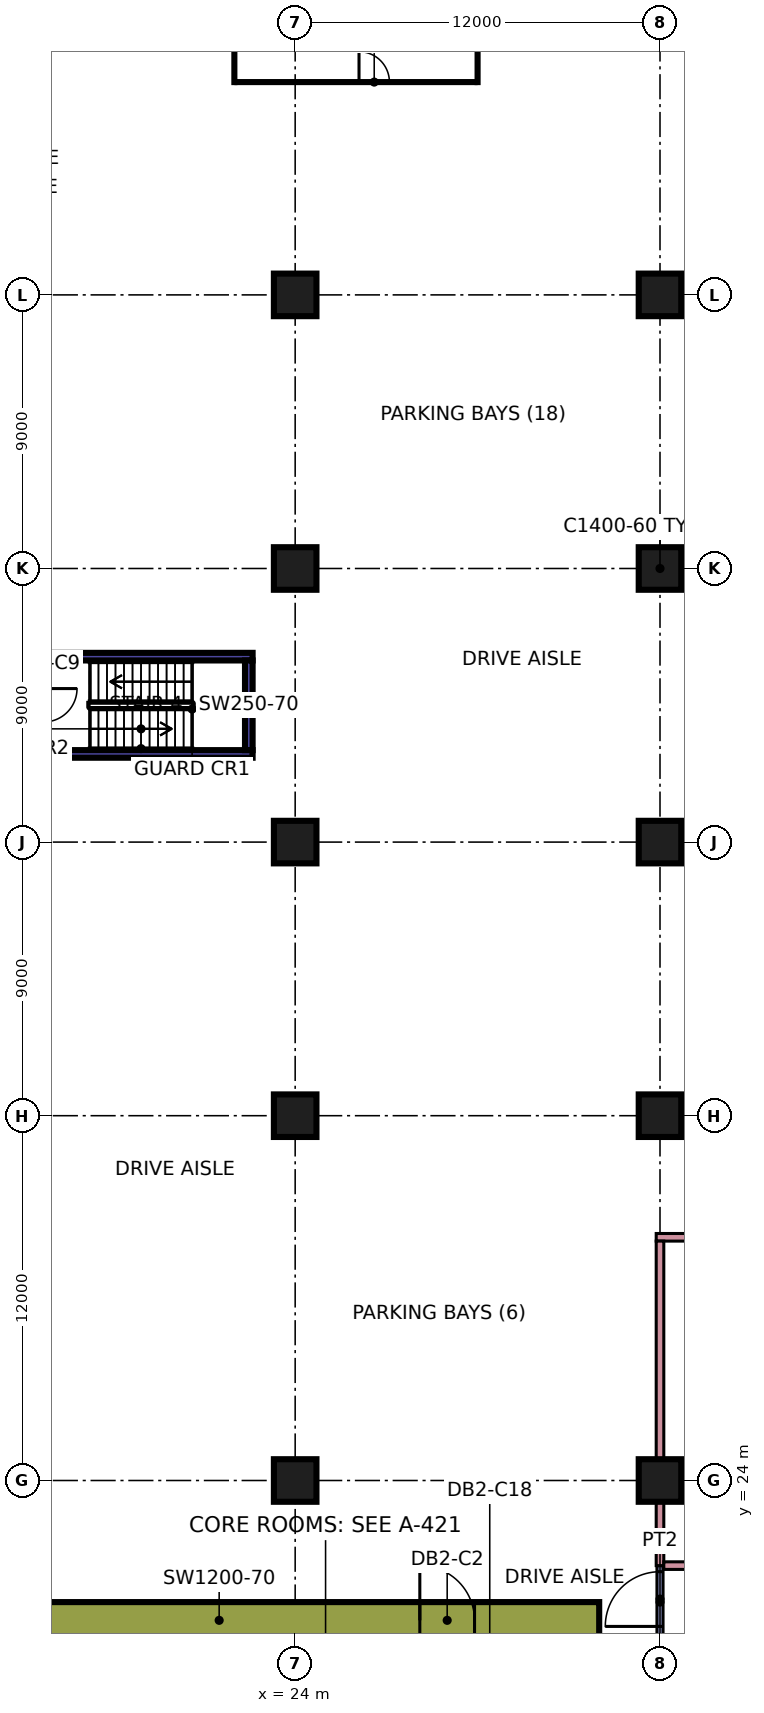
"""IFC4 building model, lengths in metres.
Left out: names, types, materials, properties, quantities, classifications, styles, units other than length and angle.
Written with IfcOpenShell. Run it as: python <this file> out.ifc"""

import sys

from ifc_helpers import new_model, si_unit, direction, frame, frame_2d, origin, origin_2d, place, context, subcontext, project, spatial, rectangle, extrude, element, fill, save


model = new_model("IFC4")
c1 = context("Model", 3, precision=1e-05, world=origin(), true_north=direction((0.0, 1.0)))
c2 = subcontext(c1, "Body", "Model", "MODEL_VIEW")
j1 = project(units=[si_unit("LENGTHUNIT", "METRE"), si_unit("PLANEANGLEUNIT", "RADIAN")], contexts=[c1])
p1 = place(None, origin())
s1 = spatial("IfcSite", under=j1, at=p1, CompositionType="ELEMENT")
p2 = place(p1, origin())
s2 = spatial("IfcBuilding", under=s1, at=p2, CompositionType="ELEMENT")
p3 = place(p2, frame((0.0, 0.0, -9.0)))
s3 = spatial("IfcBuildingStorey", under=s2, at=p3, CompositionType="ELEMENT", Elevation=-9.0)
for number, where, z_axis, x_axis in (
    (1, (24.0, 24.0, 0.0), (0.0, 0.0, 1.0), (1.0, 0.0, 0.0)),
    (2, (24.0, 36.0, 0.0), (0.0, 0.0, 1.0), (1.0, 0.0, 0.0)),
    (3, (24.0, 45.0, 0.0), (0.0, 0.0, 1.0), (1.0, 0.0, 0.0)),
    (4, (24.0, 54.0, 0.0), (0.0, 0.0, 1.0), (1.0, 0.0, 0.0)),
    (5, (24.0, 63.0, 0.0), (0.0, 0.0, 1.0), (1.0, 0.0, 0.0)),
    (6, (36.0, 24.0, 0.0), (0.0, 0.0, 1.0), (1.0, 0.0, 0.0)),
    (7, (36.0, 36.0, 0.0), (0.0, 0.0, 1.0), (1.0, 0.0, 0.0)),
    (8, (36.0, 45.0, 0.0), (0.0, 0.0, 1.0), (1.0, 0.0, 0.0)),
    (9, (36.0, 54.0, 0.0), (0.0, 0.0, 1.0), (1.0, 0.0, 0.0)),
    (10, (36.0, 63.0, 0.0), (0.0, 0.0, 1.0), (1.0, 0.0, 0.0)),
):
    element("IfcColumn", number, at=place(p3, frame(where, z_axis=z_axis, x_axis=x_axis)), inside=s3, PredefinedType="COLUMN", context=c2, shape_type="SweptSolid", body=[
        extrude(rectangle(XDim=1.4, YDim=1.4, at=origin_2d()), origin(), (0.0, 0.0, 1.0), 4.5),
    ])
p4 = place(p3, frame((9.0, 19.4, 0.0), z_axis=(0.0, 0.0, 1.0), x_axis=(1.0, 0.0, 0.0)))
e11 = element("IfcWall", 11, at=p4, inside=s3, PredefinedType="SHEAR", context=c2, shape_type="SweptSolid", body=[
    extrude(rectangle(XDim=25.0, YDim=1.2, at=frame_2d((12.5, 0.0))), origin(), (0.0, 0.0, 1.0), 4.5),
])
p5 = place(p4, frame((19.1, 0.0, 0.0)))
e12 = element("IfcOpeningElement", 12, at=p5, cuts=e11, PredefinedType="OPENING", context=c2, shape_type="SweptSolid", body=[
    extrude(rectangle(XDim=1.8, YDim=2.4, at=frame_2d((0.9, 1.2))), frame((0.0, 0.61, 0.0), z_axis=(0.0, -1.0, 0.0), x_axis=(1.0, 0.0, 0.0)), (0.0, 0.0, 1.0), 1.22),
])
for number, where, z_axis, x_axis in (
    (13, (15.6, 47.9, 0.0), (0.0, 0.0, 1.0), (1.0, 0.0, 0.0)),
    (14, (15.6, 51.1, 0.0), (0.0, 0.0, 1.0), (1.0, 0.0, 0.0)),
):
    element("IfcWall", number, at=place(p3, frame(where, z_axis=z_axis, x_axis=x_axis)), inside=s3, PredefinedType="SHEAR", context=c2, shape_type="SweptSolid", body=[
        extrude(rectangle(XDim=7.0, YDim=0.25, at=frame_2d((3.5, 0.0))), origin(), (0.0, 0.0, 1.0), 4.5),
    ])
p6 = place(p3, frame((22.475, 48.025, 0.0), z_axis=(0.0, 0.0, 1.0), x_axis=(0.0, 1.0, 0.0)))
e15 = element("IfcWall", 15, at=p6, inside=s3, PredefinedType="SHEAR", context=c2, shape_type="SweptSolid", body=[
    extrude(rectangle(XDim=2.95, YDim=0.25, at=frame_2d((1.475, 0.0))), origin(), (0.0, 0.0, 1.0), 4.5),
])
p7 = place(p3, frame((22.0, 69.95, 0.0), z_axis=(0.0, 0.0, 1.0), x_axis=(0.0, 1.0, 0.0)))
e16 = element("IfcWall", 16, at=p7, inside=s3, PredefinedType="PARTITIONING", context=c2, shape_type="SweptSolid", body=[
    extrude(rectangle(XDim=10.1, YDim=0.1, at=frame_2d((5.05, 0.0))), origin(), (0.0, 0.0, 1.0), 4.05),
])
p8 = place(p3, frame((22.05, 70.0, 0.0), z_axis=(0.0, 0.0, 1.0), x_axis=(1.0, 0.0, 0.0)))
e17 = element("IfcWall", 17, at=p8, inside=s3, PredefinedType="PARTITIONING", context=c2, shape_type="SweptSolid", body=[
    extrude(rectangle(XDim=7.9, YDim=0.1, at=frame_2d((3.95, 0.0))), origin(), (0.0, 0.0, 1.0), 4.05),
])
p9 = place(p8, frame((4.05, 0.0, 0.0)))
e18 = element("IfcOpeningElement", 18, at=p9, cuts=e17, PredefinedType="OPENING", context=c2, shape_type="SweptSolid", body=[
    extrude(rectangle(XDim=1.0, YDim=2.1, at=frame_2d((0.5, 1.05))), frame((0.0, 0.06, 0.0), z_axis=(0.0, -1.0, 0.0), x_axis=(1.0, 0.0, 0.0)), (0.0, 0.0, 1.0), 0.12),
])
p10 = place(p3, frame((30.0, 69.95, 0.0), z_axis=(0.0, 0.0, 1.0), x_axis=(0.0, 1.0, 0.0)))
e19 = element("IfcWall", 19, at=p10, inside=s3, PredefinedType="PARTITIONING", context=c2, shape_type="SweptSolid", body=[
    extrude(rectangle(XDim=10.1, YDim=0.1, at=frame_2d((5.05, 0.0))), origin(), (0.0, 0.0, 1.0), 4.05),
])
p11 = place(p3, frame((35.875, 32.0, 0.0), z_axis=(0.0, 0.0, 1.0), x_axis=(1.0, 0.0, 0.0)))
e20 = element("IfcWall", 20, at=p11, inside=s3, PredefinedType="PARTITIONING", context=c2, shape_type="SweptSolid", body=[
    extrude(rectangle(XDim=33.809, YDim=0.25, at=frame_2d((16.905, 0.0))), origin(), (0.0, 0.0, 1.0), 4.05),
])
p12 = place(p3, frame((36.0, 18.8, 0.0), z_axis=(0.0, 0.0, 1.0), x_axis=(0.0, 1.0, 0.0)))
e21 = element("IfcWall", 21, at=p12, inside=s3, PredefinedType="PARTITIONING", context=c2, shape_type="SweptSolid", body=[
    extrude(rectangle(XDim=2.4, YDim=0.2, at=frame_2d((1.2, 0.0))), origin(), (0.0, 0.0, 1.0), 4.05),
])
p13 = place(p12, frame((0.4, 0.0, 0.0)))
e22 = element("IfcOpeningElement", 22, at=p13, cuts=e21, PredefinedType="OPENING", context=c2, shape_type="SweptSolid", body=[
    extrude(rectangle(XDim=1.8, YDim=2.1, at=frame_2d((0.9, 1.05))), frame((0.0, 0.11, 0.0), z_axis=(0.0, -1.0, 0.0), x_axis=(1.0, 0.0, 0.0)), (0.0, 0.0, 1.0), 0.22),
])
p14 = place(p3, frame((36.0, 21.2, 0.0), z_axis=(0.0, 0.0, 1.0), x_axis=(0.0, 1.0, 0.0)))
e23 = element("IfcWall", 23, at=p14, inside=s3, PredefinedType="PARTITIONING", context=c2, shape_type="SweptSolid", body=[
    extrude(rectangle(XDim=2.101, YDim=0.25, at=frame_2d((1.051, 0.0))), origin(), (0.0, 0.0, 1.0), 4.05),
])
p15 = place(p3, frame((36.0, 24.699, 0.0), z_axis=(0.0, 0.0, 1.0), x_axis=(0.0, 1.0, 0.0)))
e24 = element("IfcWall", 24, at=p15, inside=s3, PredefinedType="PARTITIONING", context=c2, shape_type="SweptSolid", body=[
    extrude(rectangle(XDim=7.176, YDim=0.25, at=frame_2d((3.588, 0.0))), origin(), (0.0, 0.0, 1.0), 4.05),
])
p16 = place(p3, frame((36.125, 21.2, 0.0), z_axis=(0.0, 0.0, 1.0), x_axis=(1.0, 0.0, 0.0)))
e25 = element("IfcWall", 25, at=p16, inside=s3, PredefinedType="PARTITIONING", context=c2, shape_type="SweptSolid", body=[
    extrude(rectangle(XDim=5.375, YDim=0.25, at=frame_2d((2.688, 0.0))), origin(), (0.0, 0.0, 1.0), 4.05),
])
p17 = place(p16, frame((1.675, 0.0, 0.0)))
e26 = element("IfcOpeningElement", 26, at=p17, cuts=e25, PredefinedType="OPENING", context=c2, shape_type="SweptSolid", body=[
    extrude(rectangle(XDim=1.8, YDim=2.1, at=frame_2d((0.9, 1.05))), frame((0.0, 0.135, 0.0), z_axis=(0.0, -1.0, 0.0), x_axis=(1.0, 0.0, 0.0)), (0.0, 0.0, 1.0), 0.27),
])
p18 = place(p5, origin())
e27 = element("IfcDoor", 27, at=p18, inside=s3, OperationType="DOUBLE_DOOR_SINGLE_SWING", PredefinedType="DOOR", context=c2, shape_type="SweptSolid", body=[
    extrude(rectangle(XDim=1.8, YDim=2.4, at=frame_2d((0.9, 1.2))), frame((0.0, 0.025, 0.0), z_axis=(0.0, -1.0, 0.0), x_axis=(1.0, 0.0, 0.0)), (0.0, 0.0, 1.0), 0.05),
])
fill(e12, e27)
p19 = place(p13, origin())
e28 = element("IfcDoor", 28, at=p19, inside=s3, OperationType="DOUBLE_DOOR_SINGLE_SWING", PredefinedType="DOOR", context=c2, shape_type="SweptSolid", body=[
    extrude(rectangle(XDim=1.8, YDim=2.1, at=frame_2d((0.9, 1.05))), frame((0.0, 0.025, 0.0), z_axis=(0.0, -1.0, 0.0), x_axis=(1.0, 0.0, 0.0)), (0.0, 0.0, 1.0), 0.05),
])
fill(e22, e28)
p20 = place(p9, origin())
e29 = element("IfcDoor", 29, at=p20, inside=s3, OperationType="SINGLE_SWING_LEFT", PredefinedType="DOOR", context=c2, shape_type="SweptSolid", body=[
    extrude(rectangle(XDim=1.0, YDim=2.1, at=frame_2d((0.5, 1.05))), frame((0.0, 0.025, 0.0), z_axis=(0.0, -1.0, 0.0), x_axis=(1.0, 0.0, 0.0)), (0.0, 0.0, 1.0), 0.05),
])
fill(e18, e29)
save(model, sys.argv[1])
